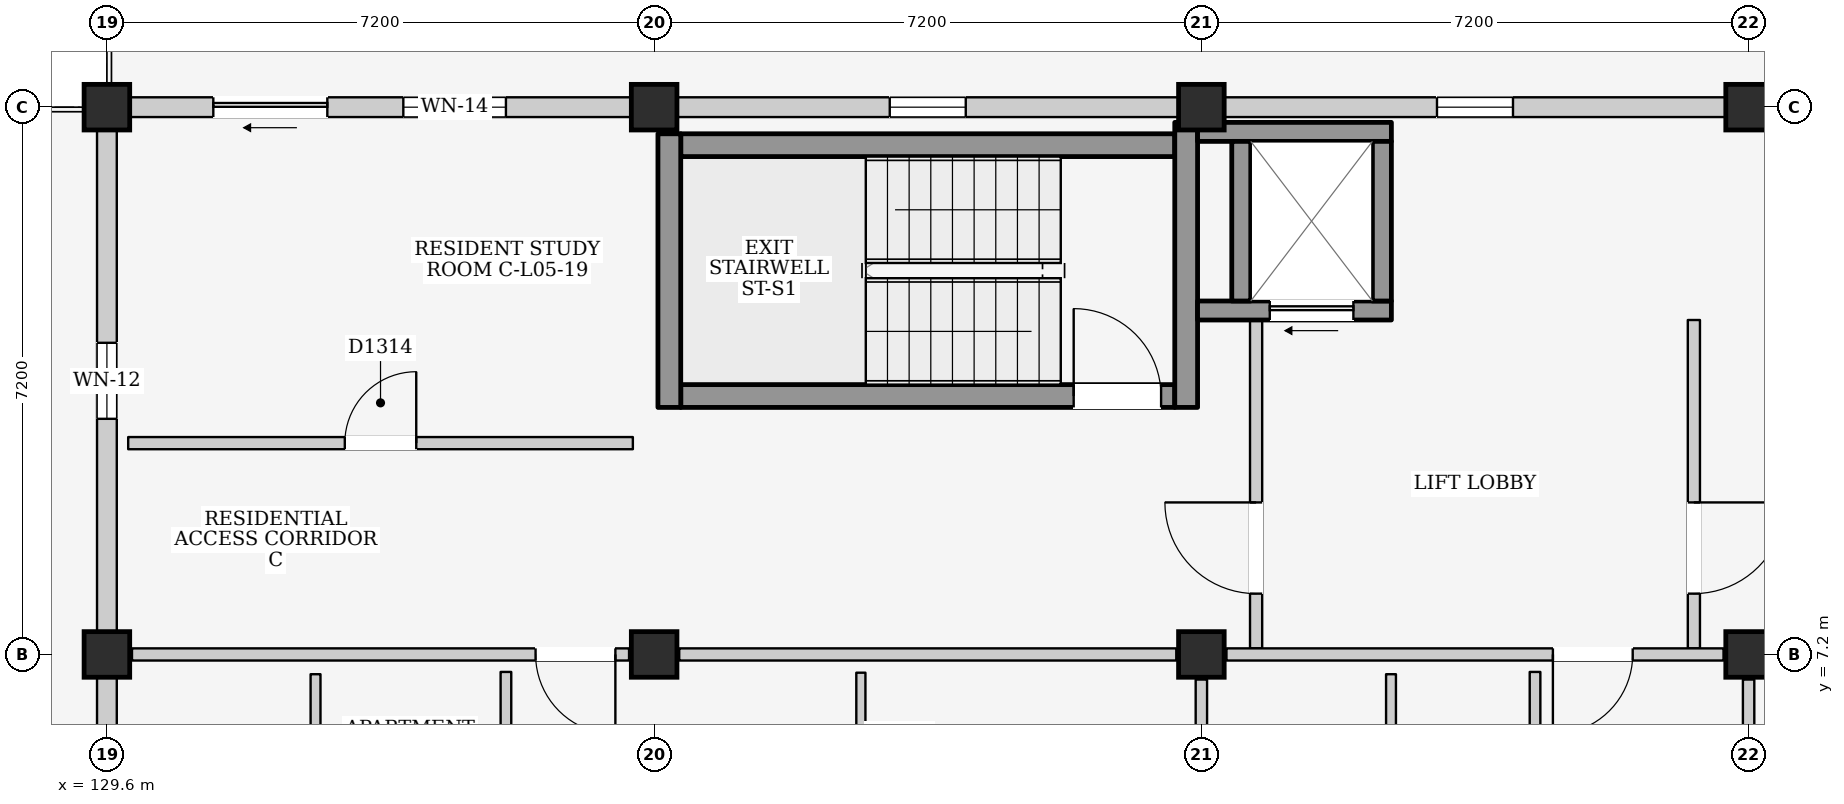
"""IFC4 building model, lengths in metres.
Left out: names, types, materials, properties, quantities, classifications, styles, units other than length and angle.
Written with IfcOpenShell. Run it as: python <this file> out.ifc"""

import sys

from ifc_helpers import new_model, si_unit, direction, frame, frame_2d, origin, origin_2d, place, context, subcontext, project, spatial, rectangle, extrude, element, fill, save


model = new_model("IFC4")
c1 = context("Model", 3, precision=1e-05, world=origin(), true_north=direction((0.0, 1.0)))
c2 = subcontext(c1, "Body", "Model", "MODEL_VIEW")
j1 = project(units=[si_unit("LENGTHUNIT", "METRE"), si_unit("PLANEANGLEUNIT", "RADIAN")], contexts=[c1])
p1 = place(None, origin())
s1 = spatial("IfcSite", under=j1, at=p1, CompositionType="ELEMENT")
p2 = place(p1, origin())
s2 = spatial("IfcBuilding", under=s1, at=p2, CompositionType="ELEMENT")
p3 = place(p2, frame((0.0, 0.0, 18.6)))
s3 = spatial("IfcBuildingStorey", under=s2, at=p3, CompositionType="ELEMENT", Elevation=18.6)
for number, where, z_axis, x_axis in (
    (1, (129.6, 7.2, 0.0), (0.0, 0.0, 1.0), (1.0, 0.0, 0.0)),
    (2, (129.6, 14.4, 0.0), (0.0, 0.0, 1.0), (1.0, 0.0, 0.0)),
    (3, (136.8, 7.2, 0.0), (0.0, 0.0, 1.0), (1.0, 0.0, 0.0)),
    (4, (136.8, 14.4, 0.0), (0.0, 0.0, 1.0), (1.0, 0.0, 0.0)),
    (5, (144.0, 7.2, 0.0), (0.0, 0.0, 1.0), (1.0, 0.0, 0.0)),
    (6, (144.0, 14.4, 0.0), (0.0, 0.0, 1.0), (1.0, 0.0, 0.0)),
    (7, (151.2, 7.2, 0.0), (0.0, 0.0, 1.0), (1.0, 0.0, 0.0)),
    (8, (151.2, 14.4, 0.0), (0.0, 0.0, 1.0), (1.0, 0.0, 0.0)),
):
    element("IfcColumn", number, at=place(p3, frame(where, z_axis=z_axis, x_axis=x_axis)), inside=s3, PredefinedType="COLUMN", context=c2, shape_type="SweptSolid", body=[
        extrude(rectangle(XDim=0.6, YDim=0.6, at=origin_2d()), origin(), (0.0, 0.0, 1.0), 3.3),
    ])
p4 = place(p3, frame((129.6, 0.3, 0.0), z_axis=(0.0, 0.0, 1.0), x_axis=(0.0, 1.0, 0.0)))
e9 = element("IfcWall", 9, at=p4, inside=s3, PredefinedType="ELEMENTEDWALL", context=c2, shape_type="SweptSolid", body=[
    extrude(rectangle(XDim=6.6, YDim=0.26, at=frame_2d((3.3, 0.0))), origin(), (0.0, 0.0, 1.0), 2.545),
])
p5 = place(p4, frame((1.4, 0.0, 0.0)))
e10 = element("IfcOpeningElement", 10, at=p5, cuts=e9, PredefinedType="OPENING", context=c2, shape_type="SweptSolid", body=[
    extrude(rectangle(XDim=1.08, YDim=2.12, at=frame_2d((0.54, 1.06))), frame((0.0, 0.145, 0.0), z_axis=(0.0, -1.0, 0.0), x_axis=(1.0, 0.0, 0.0)), (0.0, 0.0, 1.0), 0.29),
])
p6 = place(p4, frame((4.4, 0.0, 0.95)))
e11 = element("IfcOpeningElement", 11, at=p6, cuts=e9, PredefinedType="OPENING", context=c2, shape_type="SweptSolid", body=[
    extrude(rectangle(XDim=1.2, YDim=1.35, at=frame_2d((0.6, 0.675))), frame((0.0, 0.145, 0.0), z_axis=(0.0, -1.0, 0.0), x_axis=(1.0, 0.0, 0.0)), (0.0, 0.0, 1.0), 0.29),
])
p7 = place(p3, frame((129.9, 14.4, 0.0), z_axis=(0.0, 0.0, 1.0), x_axis=(1.0, 0.0, 0.0)))
e12 = element("IfcWall", 12, at=p7, inside=s3, PredefinedType="ELEMENTEDWALL", context=c2, shape_type="SweptSolid", body=[
    extrude(rectangle(XDim=6.6, YDim=0.26, at=frame_2d((3.3, 0.0))), origin(), (0.0, 0.0, 1.0), 2.445),
])
p8 = place(p7, frame((1.1, 0.0, 0.0)))
e13 = element("IfcOpeningElement", 13, at=p8, cuts=e12, PredefinedType="OPENING", context=c2, shape_type="SweptSolid", body=[
    extrude(rectangle(XDim=1.5, YDim=2.12, at=frame_2d((0.75, 1.06))), frame((0.0, 0.145, 0.0), z_axis=(0.0, -1.0, 0.0), x_axis=(1.0, 0.0, 0.0)), (0.0, 0.0, 1.0), 0.29),
])
p9 = place(p7, frame((3.6, 0.0, 0.835)))
e14 = element("IfcOpeningElement", 14, at=p9, cuts=e12, PredefinedType="OPENING", context=c2, shape_type="SweptSolid", body=[
    extrude(rectangle(XDim=1.35, YDim=1.5, at=frame_2d((0.675, 0.75))), frame((0.0, 0.145, 0.0), z_axis=(0.0, -1.0, 0.0), x_axis=(1.0, 0.0, 0.0)), (0.0, 0.0, 1.0), 0.29),
])
p10 = place(p3, frame((129.6, 7.5, 0.0), z_axis=(0.0, 0.0, 1.0), x_axis=(0.0, 1.0, 0.0)))
e15 = element("IfcWall", 15, at=p10, inside=s3, PredefinedType="ELEMENTEDWALL", context=c2, shape_type="SweptSolid", body=[
    extrude(rectangle(XDim=6.6, YDim=0.26, at=frame_2d((3.3, 0.0))), origin(), (0.0, 0.0, 1.0), 2.545),
])
p11 = place(p10, frame((2.8, 0.0, 1.1)))
e16 = element("IfcOpeningElement", 16, at=p11, cuts=e15, PredefinedType="OPENING", context=c2, shape_type="SweptSolid", body=[
    extrude(rectangle(XDim=1.0, YDim=0.9, at=frame_2d((0.5, 0.45))), frame((0.0, 0.145, 0.0), z_axis=(0.0, -1.0, 0.0), x_axis=(1.0, 0.0, 0.0)), (0.0, 0.0, 1.0), 0.29),
])
p12 = place(p3, frame((137.1, 14.4, 0.0), z_axis=(0.0, 0.0, 1.0), x_axis=(1.0, 0.0, 0.0)))
e17 = element("IfcWall", 17, at=p12, inside=s3, PredefinedType="ELEMENTEDWALL", context=c2, shape_type="SweptSolid", body=[
    extrude(rectangle(XDim=6.6, YDim=0.26, at=frame_2d((3.3, 0.0))), origin(), (0.0, 0.0, 1.0), 2.445),
])
p13 = place(p12, frame((2.8, 0.0, 1.2)))
e18 = element("IfcOpeningElement", 18, at=p13, cuts=e17, PredefinedType="OPENING", context=c2, shape_type="SweptSolid", body=[
    extrude(rectangle(XDim=1.0, YDim=0.9, at=frame_2d((0.5, 0.45))), frame((0.0, 0.145, 0.0), z_axis=(0.0, -1.0, 0.0), x_axis=(1.0, 0.0, 0.0)), (0.0, 0.0, 1.0), 0.29),
])
p14 = place(p3, frame((144.3, 14.4, 0.0), z_axis=(0.0, 0.0, 1.0), x_axis=(1.0, 0.0, 0.0)))
e19 = element("IfcWall", 19, at=p14, inside=s3, PredefinedType="ELEMENTEDWALL", context=c2, shape_type="SweptSolid", body=[
    extrude(rectangle(XDim=6.6, YDim=0.26, at=frame_2d((3.3, 0.0))), origin(), (0.0, 0.0, 1.0), 2.445),
])
p15 = place(p14, frame((2.8, 0.0, 1.2)))
e20 = element("IfcOpeningElement", 20, at=p15, cuts=e19, PredefinedType="OPENING", context=c2, shape_type="SweptSolid", body=[
    extrude(rectangle(XDim=1.0, YDim=0.9, at=frame_2d((0.5, 0.45))), frame((0.0, 0.145, 0.0), z_axis=(0.0, -1.0, 0.0), x_axis=(1.0, 0.0, 0.0)), (0.0, 0.0, 1.0), 0.29),
])
p16 = place(p3, frame((137.15, 10.6, 0.0), z_axis=(0.0, 0.0, 1.0), x_axis=(1.0, 0.0, 0.0)))
e21 = element("IfcWall", 21, at=p16, inside=s3, PredefinedType="SHEAR", context=c2, shape_type="SweptSolid", body=[
    extrude(rectangle(XDim=6.5, YDim=0.3, at=frame_2d((3.25, 0.0))), origin(), (0.0, 0.0, 1.0), 3.06),
])
p17 = place(p16, frame((5.17, 0.0, 0.0)))
e22 = element("IfcOpeningElement", 22, at=p17, cuts=e21, PredefinedType="OPENING", context=c2, shape_type="SweptSolid", body=[
    extrude(rectangle(XDim=1.15, YDim=2.2, at=frame_2d((0.575, 1.1))), frame((0.0, 0.165, 0.0), z_axis=(0.0, -1.0, 0.0), x_axis=(1.0, 0.0, 0.0)), (0.0, 0.0, 1.0), 0.33),
])
p18 = place(p3, frame((137.15, 13.9, 0.0), z_axis=(0.0, 0.0, 1.0), x_axis=(1.0, 0.0, 0.0)))
e23 = element("IfcWall", 23, at=p18, inside=s3, PredefinedType="SHEAR", context=c2, shape_type="SweptSolid", body=[
    extrude(rectangle(XDim=6.5, YDim=0.3, at=frame_2d((3.25, 0.0))), origin(), (0.0, 0.0, 1.0), 3.06),
])
p19 = place(p3, frame((137.0, 10.45, 0.0), z_axis=(0.0, 0.0, 1.0), x_axis=(0.0, 1.0, 0.0)))
e24 = element("IfcWall", 24, at=p19, inside=s3, PredefinedType="SHEAR", context=c2, shape_type="SweptSolid", body=[
    extrude(rectangle(XDim=3.6, YDim=0.3, at=frame_2d((1.8, 0.0))), origin(), (0.0, 0.0, 1.0), 3.06),
])
p20 = place(p3, frame((143.8, 10.45, 0.0), z_axis=(0.0, 0.0, 1.0), x_axis=(0.0, 1.0, 0.0)))
e25 = element("IfcWall", 25, at=p20, inside=s3, PredefinedType="SHEAR", context=c2, shape_type="SweptSolid", body=[
    extrude(rectangle(XDim=3.75, YDim=0.3, at=frame_2d((1.875, 0.0))), origin(), (0.0, 0.0, 1.0), 3.06),
])
p21 = place(p3, frame((144.72, 7.28, 0.0), z_axis=(0.0, 0.0, 1.0), x_axis=(0.0, 1.0, 0.0)))
e26 = element("IfcWall", 26, at=p21, inside=s3, PredefinedType="PARTITIONING", context=c2, shape_type="SweptSolid", body=[
    extrude(rectangle(XDim=4.32, YDim=0.16, at=frame_2d((2.16, 0.0))), origin(), (0.0, 0.0, 1.0), 3.06),
])
p22 = place(p21, frame((0.72, 0.0, 0.0)))
e27 = element("IfcOpeningElement", 27, at=p22, cuts=e26, PredefinedType="OPENING", context=c2, shape_type="SweptSolid", body=[
    extrude(rectangle(XDim=1.2, YDim=2.2, at=frame_2d((0.6, 1.1))), frame((0.0, 0.095, 0.0), z_axis=(0.0, -1.0, 0.0), x_axis=(1.0, 0.0, 0.0)), (0.0, 0.0, 1.0), 0.19),
])
p23 = place(p3, frame((150.48, 7.28, 0.0), z_axis=(0.0, 0.0, 1.0), x_axis=(0.0, 1.0, 0.0)))
e28 = element("IfcWall", 28, at=p23, inside=s3, PredefinedType="PARTITIONING", context=c2, shape_type="SweptSolid", body=[
    extrude(rectangle(XDim=4.32, YDim=0.16, at=frame_2d((2.16, 0.0))), origin(), (0.0, 0.0, 1.0), 3.06),
])
p24 = place(p23, frame((0.72, 0.0, 0.0)))
e29 = element("IfcOpeningElement", 29, at=p24, cuts=e28, PredefinedType="OPENING", context=c2, shape_type="SweptSolid", body=[
    extrude(rectangle(XDim=1.2, YDim=2.2, at=frame_2d((0.6, 1.1))), frame((0.0, 0.095, 0.0), z_axis=(0.0, -1.0, 0.0), x_axis=(1.0, 0.0, 0.0)), (0.0, 0.0, 1.0), 0.19),
])
p25 = place(p3, frame((143.95, 11.725, 0.0), z_axis=(0.0, 0.0, 1.0), x_axis=(1.0, 0.0, 0.0)))
e30 = element("IfcWall", 30, at=p25, inside=s3, PredefinedType="SHEAR", context=c2, shape_type="SweptSolid", body=[
    extrude(rectangle(XDim=2.55, YDim=0.25, at=frame_2d((1.275, 0.0))), origin(), (0.0, 0.0, 1.0), 3.06),
])
p26 = place(p25, frame((0.95, 0.0, 0.0)))
e31 = element("IfcOpeningElement", 31, at=p26, cuts=e30, PredefinedType="OPENING", context=c2, shape_type="SweptSolid", body=[
    extrude(rectangle(XDim=1.1, YDim=2.15, at=frame_2d((0.55, 1.075))), frame((0.0, 0.14, 0.0), z_axis=(0.0, -1.0, 0.0), x_axis=(1.0, 0.0, 0.0)), (0.0, 0.0, 1.0), 0.28),
])
p27 = place(p3, frame((143.95, 14.075, 0.0), z_axis=(0.0, 0.0, 1.0), x_axis=(1.0, 0.0, 0.0)))
e32 = element("IfcWall", 32, at=p27, inside=s3, PredefinedType="SHEAR", context=c2, shape_type="SweptSolid", body=[
    extrude(rectangle(XDim=2.55, YDim=0.25, at=frame_2d((1.275, 0.0))), origin(), (0.0, 0.0, 1.0), 3.06),
])
for number, where, z_axis, x_axis in (
    (33, (144.525, 11.85, 0.0), (0.0, 0.0, 1.0), (0.0, 1.0, 0.0)),
    (34, (146.375, 11.85, 0.0), (0.0, 0.0, 1.0), (0.0, 1.0, 0.0)),
):
    element("IfcWall", number, at=place(p3, frame(where, z_axis=z_axis, x_axis=x_axis)), inside=s3, PredefinedType="SHEAR", context=c2, shape_type="SweptSolid", body=[
        extrude(rectangle(XDim=2.1, YDim=0.25, at=frame_2d((1.05, 0.0))), origin(), (0.0, 0.0, 1.0), 3.06),
    ])
p28 = place(p3, frame((129.93, 7.2, 0.0), z_axis=(0.0, 0.0, 1.0), x_axis=(1.0, 0.0, 0.0)))
e35 = element("IfcWall", 35, at=p28, inside=s3, PredefinedType="PARTITIONING", context=c2, shape_type="SweptSolid", body=[
    extrude(rectangle(XDim=6.54, YDim=0.16, at=frame_2d((3.27, 0.0))), origin(), (0.0, 0.0, 1.0), 2.445),
])
p29 = place(p28, frame((5.31, 0.0, 0.0)))
e36 = element("IfcOpeningElement", 36, at=p29, cuts=e35, PredefinedType="OPENING", context=c2, shape_type="SweptSolid", body=[
    extrude(rectangle(XDim=1.05, YDim=2.15, at=frame_2d((0.525, 1.075))), frame((0.0, 0.095, 0.0), z_axis=(0.0, -1.0, 0.0), x_axis=(1.0, 0.0, 0.0)), (0.0, 0.0, 1.0), 0.19),
])
p30 = place(p3, frame((137.13, 7.2, 0.0), z_axis=(0.0, 0.0, 1.0), x_axis=(1.0, 0.0, 0.0)))
e37 = element("IfcWall", 37, at=p30, inside=s3, PredefinedType="PARTITIONING", context=c2, shape_type="SweptSolid", body=[
    extrude(rectangle(XDim=6.54, YDim=0.16, at=frame_2d((3.27, 0.0))), origin(), (0.0, 0.0, 1.0), 2.445),
])
p31 = place(p3, frame((144.0, 0.33, 0.0), z_axis=(0.0, 0.0, 1.0), x_axis=(0.0, 1.0, 0.0)))
e38 = element("IfcWall", 38, at=p31, inside=s3, PredefinedType="PARTITIONING", context=c2, shape_type="SweptSolid", body=[
    extrude(rectangle(XDim=6.54, YDim=0.15, at=frame_2d((3.27, 0.0))), origin(), (0.0, 0.0, 1.0), 2.545),
])
p32 = place(p3, frame((132.345, 3.9, 0.0), z_axis=(0.0, 0.0, 1.0), x_axis=(0.0, 1.0, 0.0)))
e39 = element("IfcWall", 39, at=p32, inside=s3, PredefinedType="PARTITIONING", context=c2, shape_type="SweptSolid", body=[
    extrude(rectangle(XDim=3.04, YDim=0.13, at=frame_2d((1.52, 0.0))), origin(), (0.0, 0.0, 1.0), 3.06),
])
p33 = place(p3, frame((134.85, 3.91, 0.0), z_axis=(0.0, 0.0, 1.0), x_axis=(0.0, 1.0, 0.0)))
e40 = element("IfcWall", 40, at=p33, inside=s3, PredefinedType="PARTITIONING", context=c2, shape_type="SweptSolid", body=[
    extrude(rectangle(XDim=3.06, YDim=0.14, at=frame_2d((1.53, 0.0))), origin(), (0.0, 0.0, 1.0), 3.06),
])
p34 = place(p3, frame((139.52, 3.92, 0.0), z_axis=(0.0, 0.0, 1.0), x_axis=(0.0, 1.0, 0.0)))
e41 = element("IfcWall", 41, at=p34, inside=s3, PredefinedType="PARTITIONING", context=c2, shape_type="SweptSolid", body=[
    extrude(rectangle(XDim=3.04, YDim=0.12, at=frame_2d((1.52, 0.0))), origin(), (0.0, 0.0, 1.0), 3.06),
])
p35 = place(p34, frame((1.04, 0.0, 0.0)))
e42 = element("IfcOpeningElement", 42, at=p35, cuts=e41, PredefinedType="OPENING", context=c2, shape_type="SweptSolid", body=[
    extrude(rectangle(XDim=0.96, YDim=2.15, at=frame_2d((0.48, 1.075))), frame((0.0, 0.075, 0.0), z_axis=(0.0, -1.0, 0.0), x_axis=(1.0, 0.0, 0.0)), (0.0, 0.0, 1.0), 0.15),
])
p36 = place(p3, frame((144.33, 7.2, 0.0), z_axis=(0.0, 0.0, 1.0), x_axis=(1.0, 0.0, 0.0)))
e43 = element("IfcWall", 43, at=p36, inside=s3, PredefinedType="PARTITIONING", context=c2, shape_type="SweptSolid", body=[
    extrude(rectangle(XDim=6.54, YDim=0.16, at=frame_2d((3.27, 0.0))), origin(), (0.0, 0.0, 1.0), 2.445),
])
p37 = place(p36, frame((4.295, 0.0, 0.0)))
e44 = element("IfcOpeningElement", 44, at=p37, cuts=e43, PredefinedType="OPENING", context=c2, shape_type="SweptSolid", body=[
    extrude(rectangle(XDim=1.05, YDim=2.15, at=frame_2d((0.525, 1.075))), frame((0.0, 0.095, 0.0), z_axis=(0.0, -1.0, 0.0), x_axis=(1.0, 0.0, 0.0)), (0.0, 0.0, 1.0), 0.19),
])
p38 = place(p3, frame((151.2, 0.33, 0.0), z_axis=(0.0, 0.0, 1.0), x_axis=(0.0, 1.0, 0.0)))
e45 = element("IfcWall", 45, at=p38, inside=s3, PredefinedType="PARTITIONING", context=c2, shape_type="SweptSolid", body=[
    extrude(rectangle(XDim=6.54, YDim=0.15, at=frame_2d((3.27, 0.0))), origin(), (0.0, 0.0, 1.0), 2.545),
])
p39 = place(p3, frame((146.495, 4.61, 0.0), z_axis=(0.0, 0.0, 1.0), x_axis=(0.0, 1.0, 0.0)))
e46 = element("IfcWall", 46, at=p39, inside=s3, PredefinedType="PARTITIONING", context=c2, shape_type="SweptSolid", body=[
    extrude(rectangle(XDim=2.33, YDim=0.13, at=frame_2d((1.165, 0.0))), origin(), (0.0, 0.0, 1.0), 3.06),
])
p40 = place(p3, frame((148.39, 4.62, 0.0), z_axis=(0.0, 0.0, 1.0), x_axis=(0.0, 1.0, 0.0)))
e47 = element("IfcWall", 47, at=p40, inside=s3, PredefinedType="PARTITIONING", context=c2, shape_type="SweptSolid", body=[
    extrude(rectangle(XDim=2.35, YDim=0.14, at=frame_2d((1.175, 0.0))), origin(), (0.0, 0.0, 1.0), 3.06),
])
p41 = place(p3, frame((129.88, 9.98, 0.0), z_axis=(0.0, 0.0, 1.0), x_axis=(1.0, 0.0, 0.0)))
e48 = element("IfcWall", 48, at=p41, inside=s3, PredefinedType="PARTITIONING", context=c2, shape_type="SweptSolid", body=[
    extrude(rectangle(XDim=6.64, YDim=0.16, at=frame_2d((3.32, 0.0))), origin(), (0.0, 0.0, 1.0), 3.06),
])
p42 = place(p41, frame((2.85, 0.0, 0.0)))
e49 = element("IfcOpeningElement", 49, at=p42, cuts=e48, PredefinedType="OPENING", context=c2, shape_type="SweptSolid", body=[
    extrude(rectangle(XDim=0.94, YDim=2.12, at=frame_2d((0.47, 1.06))), frame((0.0, 0.095, 0.0), z_axis=(0.0, -1.0, 0.0), x_axis=(1.0, 0.0, 0.0)), (0.0, 0.0, 1.0), 0.19),
])
p43 = place(p8, frame((1.5, 0.0, 0.0), z_axis=(0.0, 0.0, 1.0), x_axis=(-1.0, 0.0, 0.0)))
e50 = element("IfcDoor", 50, at=p43, inside=s3, OperationType="SLIDING_TO_LEFT", PredefinedType="DOOR", context=c2, shape_type="SweptSolid", body=[
    extrude(rectangle(XDim=1.5, YDim=2.12, at=frame_2d((0.75, 1.06))), frame((0.0, 0.025, 0.0), z_axis=(0.0, -1.0, 0.0), x_axis=(1.0, 0.0, 0.0)), (0.0, 0.0, 1.0), 0.05),
])
fill(e13, e50)
p44 = place(p9, origin())
e51 = element("IfcWindow", 51, at=p44, inside=s3, PartitioningType="SINGLE_PANEL", PredefinedType="WINDOW", context=c2, shape_type="SweptSolid", body=[
    extrude(rectangle(XDim=1.35, YDim=1.5, at=frame_2d((0.675, 0.75))), frame((0.0, 0.03, 0.0), z_axis=(0.0, -1.0, 0.0), x_axis=(1.0, 0.0, 0.0)), (0.0, 0.0, 1.0), 0.06),
])
fill(e14, e51)
p45 = place(p11, origin())
e52 = element("IfcWindow", 52, at=p45, inside=s3, PartitioningType="SINGLE_PANEL", PredefinedType="WINDOW", context=c2, shape_type="SweptSolid", body=[
    extrude(rectangle(XDim=1.0, YDim=0.9, at=frame_2d((0.5, 0.45))), frame((0.0, 0.03, 0.0), z_axis=(0.0, -1.0, 0.0), x_axis=(1.0, 0.0, 0.0)), (0.0, 0.0, 1.0), 0.06),
])
fill(e16, e52)
p46 = place(p13, origin())
e53 = element("IfcWindow", 53, at=p46, inside=s3, PartitioningType="SINGLE_PANEL", PredefinedType="WINDOW", context=c2, shape_type="SweptSolid", body=[
    extrude(rectangle(XDim=1.0, YDim=0.9, at=frame_2d((0.5, 0.45))), frame((0.0, 0.03, 0.0), z_axis=(0.0, -1.0, 0.0), x_axis=(1.0, 0.0, 0.0)), (0.0, 0.0, 1.0), 0.06),
])
fill(e18, e53)
p47 = place(p15, origin())
e54 = element("IfcWindow", 54, at=p47, inside=s3, PartitioningType="SINGLE_PANEL", PredefinedType="WINDOW", context=c2, shape_type="SweptSolid", body=[
    extrude(rectangle(XDim=1.0, YDim=0.9, at=frame_2d((0.5, 0.45))), frame((0.0, 0.03, 0.0), z_axis=(0.0, -1.0, 0.0), x_axis=(1.0, 0.0, 0.0)), (0.0, 0.0, 1.0), 0.06),
])
fill(e20, e54)
p48 = place(p17, origin())
e55 = element("IfcDoor", 55, at=p48, inside=s3, OperationType="SINGLE_SWING_LEFT", PredefinedType="DOOR", context=c2, shape_type="SweptSolid", body=[
    extrude(rectangle(XDim=1.15, YDim=2.2, at=frame_2d((0.575, 1.1))), frame((0.0, 0.025, 0.0), z_axis=(0.0, -1.0, 0.0), x_axis=(1.0, 0.0, 0.0)), (0.0, 0.0, 1.0), 0.05),
])
fill(e22, e55)
p49 = place(p22, origin())
e56 = element("IfcDoor", 56, at=p49, inside=s3, OperationType="SINGLE_SWING_RIGHT", PredefinedType="DOOR", context=c2, shape_type="SweptSolid", body=[
    extrude(rectangle(XDim=1.2, YDim=2.2, at=frame_2d((0.6, 1.1))), frame((0.0, 0.025, 0.0), z_axis=(0.0, -1.0, 0.0), x_axis=(1.0, 0.0, 0.0)), (0.0, 0.0, 1.0), 0.05),
])
fill(e27, e56)
p50 = place(p24, frame((1.2, 0.0, 0.0), z_axis=(0.0, 0.0, 1.0), x_axis=(-1.0, 0.0, 0.0)))
e57 = element("IfcDoor", 57, at=p50, inside=s3, OperationType="SINGLE_SWING_LEFT", PredefinedType="DOOR", context=c2, shape_type="SweptSolid", body=[
    extrude(rectangle(XDim=1.2, YDim=2.2, at=frame_2d((0.6, 1.1))), frame((0.0, 0.025, 0.0), z_axis=(0.0, -1.0, 0.0), x_axis=(1.0, 0.0, 0.0)), (0.0, 0.0, 1.0), 0.05),
])
fill(e29, e57)
p51 = place(p26, frame((1.1, 0.0, 0.0), z_axis=(0.0, 0.0, 1.0), x_axis=(-1.0, 0.0, 0.0)))
e58 = element("IfcDoor", 58, at=p51, inside=s3, OperationType="SLIDING_TO_LEFT", PredefinedType="DOOR", context=c2, shape_type="SweptSolid", body=[
    extrude(rectangle(XDim=1.1, YDim=2.15, at=frame_2d((0.55, 1.075))), frame((0.0, 0.025, 0.0), z_axis=(0.0, -1.0, 0.0), x_axis=(1.0, 0.0, 0.0)), (0.0, 0.0, 1.0), 0.05),
])
fill(e31, e58)
p52 = place(p29, frame((1.05, 0.0, 0.0), z_axis=(0.0, 0.0, 1.0), x_axis=(-1.0, 0.0, 0.0)))
e59 = element("IfcDoor", 59, at=p52, inside=s3, OperationType="SINGLE_SWING_LEFT", PredefinedType="DOOR", context=c2, shape_type="SweptSolid", body=[
    extrude(rectangle(XDim=1.05, YDim=2.15, at=frame_2d((0.525, 1.075))), frame((0.0, 0.025, 0.0), z_axis=(0.0, -1.0, 0.0), x_axis=(1.0, 0.0, 0.0)), (0.0, 0.0, 1.0), 0.05),
])
fill(e36, e59)
p53 = place(p37, frame((1.05, 0.0, 0.0), z_axis=(0.0, 0.0, 1.0), x_axis=(-1.0, 0.0, 0.0)))
e60 = element("IfcDoor", 60, at=p53, inside=s3, OperationType="SINGLE_SWING_RIGHT", PredefinedType="DOOR", context=c2, shape_type="SweptSolid", body=[
    extrude(rectangle(XDim=1.05, YDim=2.15, at=frame_2d((0.525, 1.075))), frame((0.0, 0.025, 0.0), z_axis=(0.0, -1.0, 0.0), x_axis=(1.0, 0.0, 0.0)), (0.0, 0.0, 1.0), 0.05),
])
fill(e44, e60)
p54 = place(p42, origin())
e61 = element("IfcDoor", 61, at=p54, inside=s3, OperationType="SINGLE_SWING_RIGHT", PredefinedType="DOOR", context=c2, shape_type="SweptSolid", body=[
    extrude(rectangle(XDim=0.94, YDim=2.12, at=frame_2d((0.47, 1.06))), frame((0.0, 0.025, 0.0), z_axis=(0.0, -1.0, 0.0), x_axis=(1.0, 0.0, 0.0)), (0.0, 0.0, 1.0), 0.05),
])
fill(e49, e61)
save(model, sys.argv[1])
